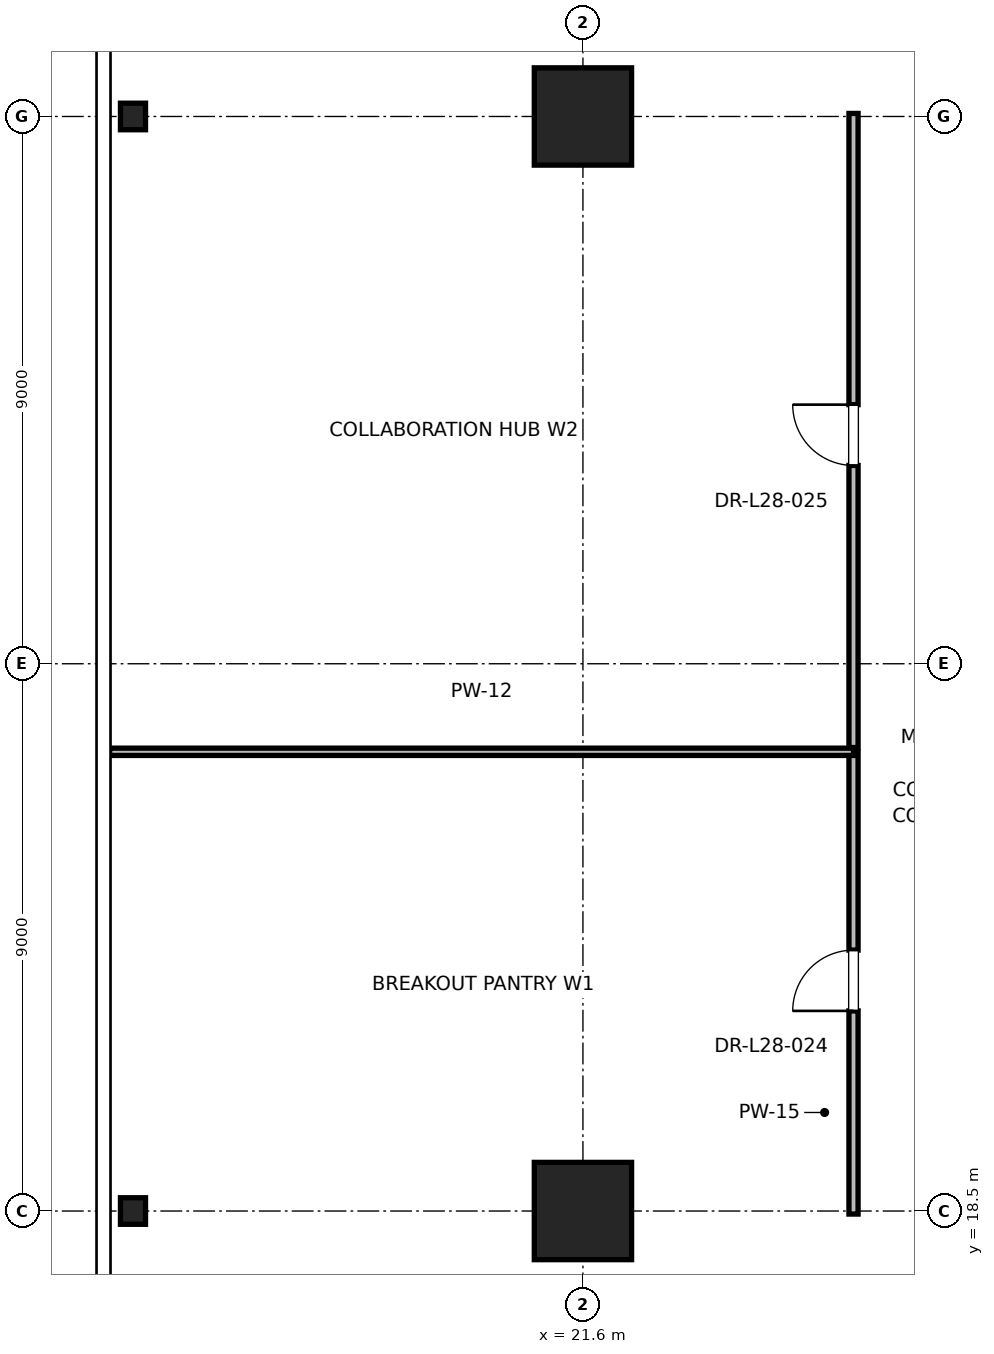
"""IFC4 building model, lengths in metres.
Left out: names, types, materials, properties, quantities, classifications, styles, units other than length and angle.
Written with IfcOpenShell. Run it as: python <this file> out.ifc"""

import sys

from ifc_helpers import new_model, si_unit, direction, frame, frame_2d, origin, origin_2d, place, context, subcontext, project, spatial, rectangle, i_section, extrude, element, fill, save


model = new_model("IFC4")
c1 = context("Model", 3, precision=1e-05, world=origin(), true_north=direction((0.0, 1.0)))
c2 = subcontext(c1, "Body", "Model", "MODEL_VIEW")
j1 = project(units=[si_unit("LENGTHUNIT", "METRE"), si_unit("PLANEANGLEUNIT", "RADIAN")], contexts=[c1])
p1 = place(None, origin())
s1 = spatial("IfcSite", under=j1, at=p1, CompositionType="ELEMENT")
p2 = place(p1, origin())
s2 = spatial("IfcBuilding", under=s1, at=p2, CompositionType="ELEMENT")
p3 = place(p2, frame((0.0, 0.0, 123.4)))
s3 = spatial("IfcBuildingStorey", under=s2, at=p3, CompositionType="ELEMENT", Elevation=123.4)
for number, where, z_axis, x_axis in (
    (1, (21.6, 18.5, 0.0), (0.0, 0.0, 1.0), (1.0, 0.0, 0.0)),
    (2, (21.6, 36.5, 0.0), (0.0, 0.0, 1.0), (1.0, 0.0, 0.0)),
):
    element("IfcColumn", number, at=place(p3, frame(where, z_axis=z_axis, x_axis=x_axis)), inside=s3, PredefinedType="COLUMN", context=c2, shape_type="SweptSolid", body=[
        extrude(rectangle(XDim=1.6, YDim=1.6, at=origin_2d()), origin(), (0.0, 0.0, 1.0), 5.0),
    ])
for number, where, z_axis, x_axis in (
    (3, (14.2, 18.5, 0.0), (0.0, 0.0, 1.0), (1.0, 0.0, 0.0)),
    (4, (14.2, 36.5, 0.0), (0.0, 0.0, 1.0), (1.0, 0.0, 0.0)),
):
    element("IfcColumn", number, at=place(p3, frame(where, z_axis=z_axis, x_axis=x_axis)), inside=s3, PredefinedType="COLUMN", context=c2, shape_type="SweptSolid", body=[
        extrude(i_section(OverallWidth=0.412, OverallDepth=0.437, WebThickness=0.036, FlangeThickness=0.058, FilletRadius=0.015, at=origin_2d()), origin(), (0.0, 0.0, 1.0), 5.0),
    ])
p4 = place(p3, frame((26.05, 18.45, 0.0), z_axis=(0.0, 0.0, 1.0), x_axis=(0.0, 1.0, 0.0)))
e5 = element("IfcWall", 5, at=p4, inside=s3, PredefinedType="PARTITIONING", context=c2, shape_type="SweptSolid", body=[
    extrude(rectangle(XDim=7.602, YDim=0.15, at=frame_2d((3.801, 0.0))), origin(), (0.0, 0.0, 1.0), 2.85),
])
p5 = place(p4, frame((3.341, 0.0, 0.0)))
e6 = element("IfcOpeningElement", 6, at=p5, cuts=e5, PredefinedType="OPENING", context=c2, shape_type="SweptSolid", body=[
    extrude(rectangle(XDim=1.0, YDim=2.15, at=frame_2d((0.5, 1.075))), frame((0.0, 0.075, 0.0), z_axis=(0.0, -1.0, 0.0), x_axis=(1.0, 0.0, 0.0)), (0.0, 0.0, 1.0), 0.15),
])
p6 = place(p3, frame((13.815, 26.052, 0.0), z_axis=(0.0, 0.0, 1.0), x_axis=(1.0, 0.0, 0.0)))
e7 = element("IfcWall", 7, at=p6, inside=s3, PredefinedType="PARTITIONING", context=c2, shape_type="SweptSolid", body=[
    extrude(rectangle(XDim=12.235, YDim=0.12, at=frame_2d((6.117, 0.0))), origin(), (0.0, 0.0, 1.0), 2.85),
])
p7 = place(p3, frame((26.05, 26.122, 0.0), z_axis=(0.0, 0.0, 1.0), x_axis=(0.0, 1.0, 0.0)))
e8 = element("IfcWall", 8, at=p7, inside=s3, PredefinedType="PARTITIONING", context=c2, shape_type="SweptSolid", body=[
    extrude(rectangle(XDim=10.428, YDim=0.15, at=frame_2d((5.214, 0.0))), origin(), (0.0, 0.0, 1.0), 2.85),
])
p8 = place(p7, frame((4.639, 0.0, 0.0)))
e9 = element("IfcOpeningElement", 9, at=p8, cuts=e8, PredefinedType="OPENING", context=c2, shape_type="SweptSolid", body=[
    extrude(rectangle(XDim=1.0, YDim=2.15, at=frame_2d((0.5, 1.075))), frame((0.0, 0.075, 0.0), z_axis=(0.0, -1.0, 0.0), x_axis=(1.0, 0.0, 0.0)), (0.0, 0.0, 1.0), 0.15),
])
p9 = place(p5, origin())
e10 = element("IfcDoor", 10, at=p9, inside=s3, OperationType="SINGLE_SWING_LEFT", PredefinedType="DOOR", context=c2, shape_type="SweptSolid", body=[
    extrude(rectangle(XDim=1.0, YDim=2.15, at=frame_2d((0.5, 1.075))), frame((0.0, 0.025, 0.0), z_axis=(0.0, -1.0, 0.0), x_axis=(1.0, 0.0, 0.0)), (0.0, 0.0, 1.0), 0.05),
])
fill(e6, e10)
p10 = place(p8, origin())
e11 = element("IfcDoor", 11, at=p10, inside=s3, OperationType="SINGLE_SWING_RIGHT", PredefinedType="DOOR", context=c2, shape_type="SweptSolid", body=[
    extrude(rectangle(XDim=1.0, YDim=2.15, at=frame_2d((0.5, 1.075))), frame((0.0, 0.025, 0.0), z_axis=(0.0, -1.0, 0.0), x_axis=(1.0, 0.0, 0.0)), (0.0, 0.0, 1.0), 0.05),
])
fill(e9, e11)
save(model, sys.argv[1])
